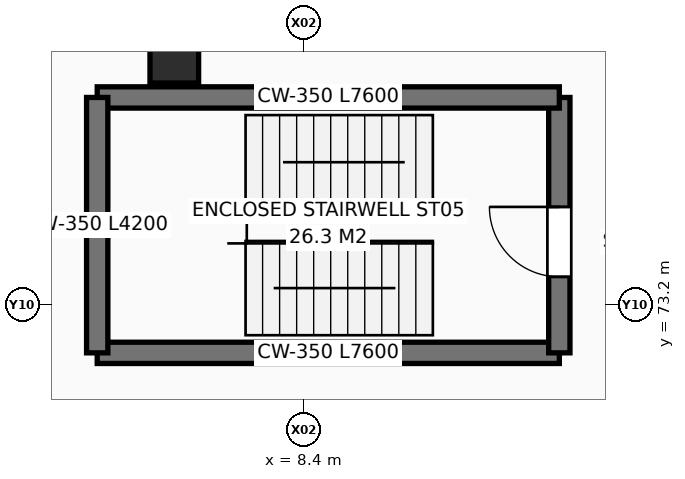
"""IFC4 building model, lengths in metres.
Left out: names, types, materials, properties, quantities, classifications, styles, units other than length and angle.
Written with IfcOpenShell. Run it as: python <this file> out.ifc"""

import sys

from ifc_helpers import new_model, si_unit, direction, frame, frame_2d, origin, origin_2d, place, context, subcontext, project, spatial, rectangle, circle, extrude, element, fill, save


model = new_model("IFC4")
c1 = context("Model", 3, precision=1e-05, world=origin(), true_north=direction((0.0, 1.0)))
c2 = subcontext(c1, "Body", "Model", "MODEL_VIEW")
j1 = project(units=[si_unit("LENGTHUNIT", "METRE"), si_unit("PLANEANGLEUNIT", "RADIAN")], contexts=[c1])
p1 = place(None, origin())
s1 = spatial("IfcSite", under=j1, at=p1, CompositionType="ELEMENT")
p2 = place(p1, origin())
s2 = spatial("IfcBuilding", under=s1, at=p2, CompositionType="ELEMENT")
p3 = place(p2, frame((0.0, 0.0, -4.2)))
s3 = spatial("IfcBuildingStorey", under=s2, at=p3, CompositionType="ELEMENT", Elevation=-4.2)
p4 = place(p3, frame((6.268, 77.237, 0.0), z_axis=(0.0, 0.0, 1.0), x_axis=(1.0, 0.0, 0.0)))
e1 = element("IfcColumn", 1, at=p4, inside=s3, PredefinedType="COLUMN", context=c2, shape_type="SweptSolid", body=[
    extrude(circle(Radius=0.4, at=origin_2d()), origin(), (0.0, 0.0, 1.0), 4.2),
])
p5 = place(p3, frame((3.233, 72.002, 0.0), z_axis=(0.0, 0.0, 1.0), x_axis=(0.707085031082, -0.707128530622, 0.0)))
e2 = element("IfcWall", 2, at=p5, inside=s3, PredefinedType="SOLIDWALL", context=c2, shape_type="SweptSolid", body=[
    extrude(rectangle(XDim=5.613, YDim=0.52, at=frame_2d((2.806, 0.0))), origin(), (0.0, 0.0, 1.0), 3.88),
])
p6 = place(p3, frame((5.0, 72.4, 0.0), z_axis=(0.0, 0.0, 1.0), x_axis=(1.0, 0.0, 0.0)))
e3 = element("IfcWall", 3, at=p6, inside=s3, PredefinedType="SHEAR", context=c2, shape_type="SweptSolid", body=[
    extrude(rectangle(XDim=7.6, YDim=0.35, at=frame_2d((3.8, 0.0))), origin(), (0.0, 0.0, 1.0), 3.92),
])
p7 = place(p3, frame((12.6, 72.4, 0.0), z_axis=(0.0, 0.0, 1.0), x_axis=(0.0, 1.0, 0.0)))
e4 = element("IfcWall", 4, at=p7, inside=s3, PredefinedType="SHEAR", context=c2, shape_type="SweptSolid", body=[
    extrude(rectangle(XDim=4.2, YDim=0.35, at=frame_2d((2.1, 0.0))), origin(), (0.0, 0.0, 1.0), 3.92),
])
p8 = place(p7, frame((1.25, 0.0, 0.0)))
e5 = element("IfcOpeningElement", 5, at=p8, cuts=e4, PredefinedType="OPENING", context=c2, shape_type="SweptSolid", body=[
    extrude(rectangle(XDim=1.15, YDim=2.2, at=frame_2d((0.575, 1.1))), frame((0.0, 0.185, 0.0), z_axis=(0.0, -1.0, 0.0), x_axis=(1.0, 0.0, 0.0)), (0.0, 0.0, 1.0), 0.37),
])
p9 = place(p3, frame((12.6, 76.6, 0.0), z_axis=(0.0, 0.0, 1.0), x_axis=(-1.0, 0.0, 0.0)))
e6 = element("IfcWall", 6, at=p9, inside=s3, PredefinedType="SHEAR", context=c2, shape_type="SweptSolid", body=[
    extrude(rectangle(XDim=7.6, YDim=0.35, at=frame_2d((3.8, 0.0))), origin(), (0.0, 0.0, 1.0), 3.92),
])
p10 = place(p3, frame((5.0, 76.6, 0.0), z_axis=(0.0, 0.0, 1.0), x_axis=(0.0, -1.0, 0.0)))
e7 = element("IfcWall", 7, at=p10, inside=s3, PredefinedType="SHEAR", context=c2, shape_type="SweptSolid", body=[
    extrude(rectangle(XDim=4.2, YDim=0.35, at=frame_2d((2.1, 0.0))), origin(), (0.0, 0.0, 1.0), 3.92),
])
p11 = place(p8, origin())
e8 = element("IfcDoor", 8, at=p11, inside=s3, OperationType="SINGLE_SWING_RIGHT", PredefinedType="DOOR", context=c2, shape_type="SweptSolid", body=[
    extrude(rectangle(XDim=1.15, YDim=2.2, at=frame_2d((0.575, 1.1))), frame((0.0, 0.025, 0.0), z_axis=(0.0, -1.0, 0.0), x_axis=(1.0, 0.0, 0.0)), (0.0, 0.0, 1.0), 0.05),
])
fill(e5, e8)
save(model, sys.argv[1])
